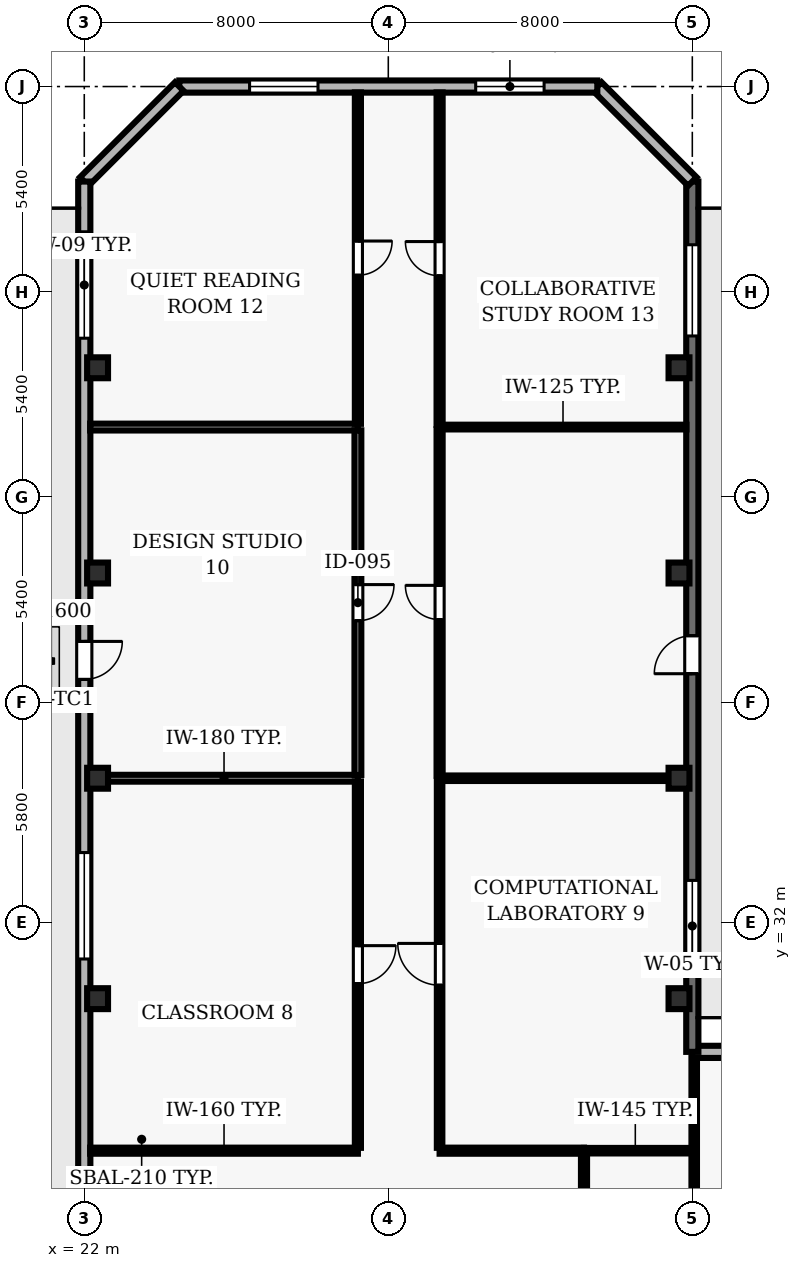
"""IFC4 building model, lengths in metres.
Left out: names, types, materials, properties, quantities, classifications, styles, units other than length and angle.
Written with IfcOpenShell. Run it as: python <this file> out.ifc"""

import sys

from ifc_helpers import new_model, si_unit, direction, frame, frame_2d, origin, origin_2d, place, context, subcontext, project, spatial, rectangle, hollow_rectangle, extrude, element, fill, save


model = new_model("IFC4")
c1 = context("Model", 3, precision=1e-05, world=origin(), true_north=direction((0.0, 1.0)))
c2 = subcontext(c1, "Body", "Model", "MODEL_VIEW")
j1 = project(units=[si_unit("LENGTHUNIT", "METRE"), si_unit("PLANEANGLEUNIT", "RADIAN")], contexts=[c1])
p1 = place(None, origin())
s1 = spatial("IfcSite", under=j1, at=p1, CompositionType="ELEMENT")
p2 = place(p1, origin())
s2 = spatial("IfcBuilding", under=s1, at=p2, CompositionType="ELEMENT")
p3 = place(p2, frame((0.0, 0.0, 38.8)))
s3 = spatial("IfcBuildingStorey", under=s2, at=p3, CompositionType="ELEMENT", Elevation=38.8)
for number, where, z_axis, x_axis in (
    (1, (22.35, 30.0, 0.0), (0.0, 0.0, 1.0), (1.0, 0.0, 0.0)),
    (2, (37.65, 30.0, 0.0), (0.0, 0.0, 1.0), (1.0, 0.0, 0.0)),
    (3, (22.35, 35.8, 0.0), (0.0, 0.0, 1.0), (1.0, 0.0, 0.0)),
    (4, (37.65, 35.8, 0.0), (0.0, 0.0, 1.0), (1.0, 0.0, 0.0)),
    (5, (22.35, 41.2, 0.0), (0.0, 0.0, 1.0), (1.0, 0.0, 0.0)),
    (6, (37.65, 41.2, 0.0), (0.0, 0.0, 1.0), (1.0, 0.0, 0.0)),
    (7, (22.35, 46.6, 0.0), (0.0, 0.0, 1.0), (1.0, 0.0, 0.0)),
    (8, (37.65, 46.6, 0.0), (0.0, 0.0, 1.0), (1.0, 0.0, 0.0)),
):
    element("IfcColumn", number, at=place(p3, frame(where, z_axis=z_axis, x_axis=x_axis)), inside=s3, PredefinedType="COLUMN", context=c2, shape_type="SweptSolid", body=[
        extrude(hollow_rectangle(XDim=0.55, YDim=0.55, WallThickness=0.025, at=origin_2d()), origin(), (0.0, 0.0, 1.0), 3.9),
    ])
p4 = place(p3, frame((54.3, 28.6, 0.0), z_axis=(0.0, 0.0, 1.0), x_axis=(-1.0, 0.0, 0.0)))
e9 = element("IfcWall", 9, at=p4, inside=s3, PredefinedType="SOLIDWALL", context=c2, shape_type="SweptSolid", body=[
    extrude(rectangle(XDim=16.3, YDim=0.32, at=frame_2d((8.15, 0.0))), origin(), (0.0, 0.0, 1.0), 3.69),
])
p5 = place(p4, frame((1.667, 0.0, 0.9)))
e10 = element("IfcOpeningElement", 10, at=p5, cuts=e9, PredefinedType="OPENING", context=c2, shape_type="SweptSolid", body=[
    extrude(rectangle(XDim=2.1, YDim=1.6, at=frame_2d((1.05, 0.8))), frame((0.0, 0.17, 0.0), z_axis=(0.0, -1.0, 0.0), x_axis=(1.0, 0.0, 0.0)), (0.0, 0.0, 1.0), 0.34),
])
p6 = place(p4, frame((7.1, 0.0, 0.9)))
e11 = element("IfcOpeningElement", 11, at=p6, cuts=e9, PredefinedType="OPENING", context=c2, shape_type="SweptSolid", body=[
    extrude(rectangle(XDim=2.1, YDim=1.6, at=frame_2d((1.05, 0.8))), frame((0.0, 0.17, 0.0), z_axis=(0.0, -1.0, 0.0), x_axis=(1.0, 0.0, 0.0)), (0.0, 0.0, 1.0), 0.34),
])
p7 = place(p4, frame((12.533, 0.0, 0.9)))
e12 = element("IfcOpeningElement", 12, at=p7, cuts=e9, PredefinedType="OPENING", context=c2, shape_type="SweptSolid", body=[
    extrude(rectangle(XDim=2.1, YDim=1.6, at=frame_2d((1.05, 0.8))), frame((0.0, 0.17, 0.0), z_axis=(0.0, -1.0, 0.0), x_axis=(1.0, 0.0, 0.0)), (0.0, 0.0, 1.0), 0.34),
])
p8 = place(p3, frame((38.0, 28.6, 0.0), z_axis=(0.0, 0.0, 1.0), x_axis=(0.0, 1.0, 0.0)))
e13 = element("IfcWall", 13, at=p8, inside=s3, PredefinedType="SOLIDWALL", context=c2, shape_type="SweptSolid", body=[
    extrude(rectangle(XDim=22.9, YDim=0.32, at=frame_2d((11.45, 0.0))), origin(), (0.0, 0.0, 1.0), 3.69),
])
p9 = place(p8, frame((9.95, 0.0, 0.0)))
e14 = element("IfcOpeningElement", 14, at=p9, cuts=e13, PredefinedType="OPENING", context=c2, shape_type="SweptSolid", body=[
    extrude(rectangle(XDim=1.0, YDim=2.2, at=frame_2d((0.5, 1.1))), frame((0.0, 0.17, 0.0), z_axis=(0.0, -1.0, 0.0), x_axis=(1.0, 0.0, 0.0)), (0.0, 0.0, 1.0), 0.34),
])
p10 = place(p8, frame((2.112, 0.0, 0.9)))
e15 = element("IfcOpeningElement", 15, at=p10, cuts=e13, PredefinedType="OPENING", context=c2, shape_type="SweptSolid", body=[
    extrude(rectangle(XDim=2.4, YDim=1.6, at=frame_2d((1.2, 0.8))), frame((0.0, 0.17, 0.0), z_axis=(0.0, -1.0, 0.0), x_axis=(1.0, 0.0, 0.0)), (0.0, 0.0, 1.0), 0.34),
])
p11 = place(p8, frame((18.837, 0.0, 0.9)))
e16 = element("IfcOpeningElement", 16, at=p11, cuts=e13, PredefinedType="OPENING", context=c2, shape_type="SweptSolid", body=[
    extrude(rectangle(XDim=2.4, YDim=1.6, at=frame_2d((1.2, 0.8))), frame((0.0, 0.17, 0.0), z_axis=(0.0, -1.0, 0.0), x_axis=(1.0, 0.0, 0.0)), (0.0, 0.0, 1.0), 0.34),
])
p12 = place(p3, frame((38.0, 51.5, 0.0), z_axis=(0.0, 0.0, 1.0), x_axis=(-0.707106781187, 0.707106781187, 0.0)))
e17 = element("IfcWall", 17, at=p12, inside=s3, PredefinedType="SOLIDWALL", context=c2, shape_type="SweptSolid", body=[
    extrude(rectangle(XDim=3.536, YDim=0.32, at=frame_2d((1.768, 0.0))), origin(), (0.0, 0.0, 1.0), 3.69),
])
p13 = place(p3, frame((35.5, 54.0, 0.0), z_axis=(0.0, 0.0, 1.0), x_axis=(-1.0, 0.0, 0.0)))
e18 = element("IfcWall", 18, at=p13, inside=s3, PredefinedType="SOLIDWALL", context=c2, shape_type="SweptSolid", body=[
    extrude(rectangle(XDim=11.0, YDim=0.32, at=frame_2d((5.5, 0.0))), origin(), (0.0, 0.0, 1.0), 3.69),
])
p14 = place(p13, frame((1.4, 0.0, 0.9)))
e19 = element("IfcOpeningElement", 19, at=p14, cuts=e18, PredefinedType="OPENING", context=c2, shape_type="SweptSolid", body=[
    extrude(rectangle(XDim=1.8, YDim=1.8, at=frame_2d((0.9, 0.9))), frame((0.0, 0.17, 0.0), z_axis=(0.0, -1.0, 0.0), x_axis=(1.0, 0.0, 0.0)), (0.0, 0.0, 1.0), 0.34),
])
p15 = place(p13, frame((7.35, 0.0, 0.9)))
e20 = element("IfcOpeningElement", 20, at=p15, cuts=e18, PredefinedType="OPENING", context=c2, shape_type="SweptSolid", body=[
    extrude(rectangle(XDim=1.8, YDim=1.8, at=frame_2d((0.9, 0.9))), frame((0.0, 0.17, 0.0), z_axis=(0.0, -1.0, 0.0), x_axis=(1.0, 0.0, 0.0)), (0.0, 0.0, 1.0), 0.34),
])
p16 = place(p3, frame((24.5, 54.0, 0.0), z_axis=(0.0, 0.0, 1.0), x_axis=(-0.707106781187, -0.707106781187, 0.0)))
e21 = element("IfcWall", 21, at=p16, inside=s3, PredefinedType="SOLIDWALL", context=c2, shape_type="SweptSolid", body=[
    extrude(rectangle(XDim=3.536, YDim=0.32, at=frame_2d((1.768, 0.0))), origin(), (0.0, 0.0, 1.0), 3.69),
])
p17 = place(p3, frame((22.0, 51.5, 0.0), z_axis=(0.0, 0.0, 1.0), x_axis=(0.0, -1.0, 0.0)))
e22 = element("IfcWall", 22, at=p17, inside=s3, PredefinedType="SOLIDWALL", context=c2, shape_type="SweptSolid", body=[
    extrude(rectangle(XDim=49.0, YDim=0.32, at=frame_2d((24.5, 0.0))), origin(), (0.0, 0.0, 1.0), 3.69),
])
p18 = place(p17, frame((12.1, 0.0, 0.0)))
e23 = element("IfcOpeningElement", 23, at=p18, cuts=e22, PredefinedType="OPENING", context=c2, shape_type="SweptSolid", body=[
    extrude(rectangle(XDim=1.0, YDim=2.2, at=frame_2d((0.5, 1.1))), frame((0.0, 0.17, 0.0), z_axis=(0.0, -1.0, 0.0), x_axis=(1.0, 0.0, 0.0)), (0.0, 0.0, 1.0), 0.34),
])
p19 = place(p17, frame((1.322, 0.0, 0.9)))
e24 = element("IfcOpeningElement", 24, at=p19, cuts=e22, PredefinedType="OPENING", context=c2, shape_type="SweptSolid", body=[
    extrude(rectangle(XDim=2.8, YDim=1.8, at=frame_2d((1.4, 0.9))), frame((0.0, 0.17, 0.0), z_axis=(0.0, -1.0, 0.0), x_axis=(1.0, 0.0, 0.0)), (0.0, 0.0, 1.0), 0.34),
])
p20 = place(p17, frame((17.656, 0.0, 0.9)))
e25 = element("IfcOpeningElement", 25, at=p20, cuts=e22, PredefinedType="OPENING", context=c2, shape_type="SweptSolid", body=[
    extrude(rectangle(XDim=2.8, YDim=1.8, at=frame_2d((1.4, 0.9))), frame((0.0, 0.17, 0.0), z_axis=(0.0, -1.0, 0.0), x_axis=(1.0, 0.0, 0.0)), (0.0, 0.0, 1.0), 0.34),
])
p21 = place(p17, frame((28.994, 0.0, 0.9)))
e26 = element("IfcOpeningElement", 26, at=p21, cuts=e22, PredefinedType="OPENING", context=c2, shape_type="SweptSolid", body=[
    extrude(rectangle(XDim=2.8, YDim=1.8, at=frame_2d((1.4, 0.9))), frame((0.0, 0.17, 0.0), z_axis=(0.0, -1.0, 0.0), x_axis=(1.0, 0.0, 0.0)), (0.0, 0.0, 1.0), 0.34),
])
p22 = place(p17, frame((33.089, 0.0, 0.9)))
e27 = element("IfcOpeningElement", 27, at=p22, cuts=e22, PredefinedType="OPENING", context=c2, shape_type="SweptSolid", body=[
    extrude(rectangle(XDim=2.8, YDim=1.8, at=frame_2d((1.4, 0.9))), frame((0.0, 0.17, 0.0), z_axis=(0.0, -1.0, 0.0), x_axis=(1.0, 0.0, 0.0)), (0.0, 0.0, 1.0), 0.34),
])
p23 = place(p17, frame((39.433, 0.0, 0.9)))
e28 = element("IfcOpeningElement", 28, at=p23, cuts=e22, PredefinedType="OPENING", context=c2, shape_type="SweptSolid", body=[
    extrude(rectangle(XDim=2.8, YDim=1.8, at=frame_2d((1.4, 0.9))), frame((0.0, 0.17, 0.0), z_axis=(0.0, -1.0, 0.0), x_axis=(1.0, 0.0, 0.0)), (0.0, 0.0, 1.0), 0.34),
])
p24 = place(p3, frame((29.2, 26.0, 0.0), z_axis=(0.0, 0.0, 1.0), x_axis=(-1.0, 0.0, 0.0)))
e29 = element("IfcWall", 29, at=p24, inside=s3, PredefinedType="PARTITIONING", context=c2, shape_type="SweptSolid", body=[
    extrude(rectangle(XDim=7.045, YDim=0.16, at=frame_2d((3.522, 0.0))), origin(), (0.0, 0.0, 1.0), 3.69),
])
p25 = place(p3, frame((29.2, 35.8, 0.0), z_axis=(0.0, 0.0, 1.0), x_axis=(-1.0, 0.0, 0.0)))
e30 = element("IfcWall", 30, at=p25, inside=s3, PredefinedType="PARTITIONING", context=c2, shape_type="SweptSolid", body=[
    extrude(rectangle(XDim=7.045, YDim=0.18, at=frame_2d((3.522, 0.0))), origin(), (0.0, 0.0, 1.0), 2.995),
])
p26 = place(p3, frame((29.2, 45.04, 0.0), z_axis=(0.0, 0.0, 1.0), x_axis=(-1.0, 0.0, 0.0)))
e31 = element("IfcWall", 31, at=p26, inside=s3, PredefinedType="PARTITIONING", context=c2, shape_type="SweptSolid", body=[
    extrude(rectangle(XDim=7.045, YDim=0.18, at=frame_2d((3.522, 0.0))), origin(), (0.0, 0.0, 1.0), 3.69),
])
p27 = place(p3, frame((35.15, 26.0, 0.0), z_axis=(0.0, 0.0, 1.0), x_axis=(-1.0, 0.0, 0.0)))
e32 = element("IfcWall", 32, at=p27, inside=s3, PredefinedType="PARTITIONING", context=c2, shape_type="SweptSolid", body=[
    extrude(rectangle(XDim=3.8, YDim=0.16, at=frame_2d((1.9, 0.0))), origin(), (0.0, 0.0, 1.0), 3.69),
])
p28 = place(p3, frame((35.15, 26.0, 0.0), z_axis=(0.0, 0.0, 1.0), x_axis=(1.0, 0.0, 0.0)))
e33 = element("IfcWall", 33, at=p28, inside=s3, PredefinedType="PARTITIONING", context=c2, shape_type="SweptSolid", body=[
    extrude(rectangle(XDim=2.7, YDim=0.145, at=frame_2d((1.35, 0.0))), origin(), (0.0, 0.0, 1.0), 3.69),
])
p29 = place(p3, frame((37.845, 35.8, 0.0), z_axis=(0.0, 0.0, 1.0), x_axis=(-1.0, 0.0, 0.0)))
e34 = element("IfcWall", 34, at=p29, inside=s3, PredefinedType="PARTITIONING", context=c2, shape_type="SweptSolid", body=[
    extrude(rectangle(XDim=6.495, YDim=0.145, at=frame_2d((3.248, 0.0))), origin(), (0.0, 0.0, 1.0), 2.995),
])
p30 = place(p3, frame((37.845, 45.04, 0.0), z_axis=(0.0, 0.0, 1.0), x_axis=(-1.0, 0.0, 0.0)))
e35 = element("IfcWall", 35, at=p30, inside=s3, PredefinedType="PARTITIONING", context=c2, shape_type="SweptSolid", body=[
    extrude(rectangle(XDim=6.495, YDim=0.125, at=frame_2d((3.248, 0.0))), origin(), (0.0, 0.0, 1.0), 3.69),
])
p31 = place(p3, frame((29.2, 35.715, 0.0), z_axis=(0.0, 0.0, 1.0), x_axis=(0.0, -1.0, 0.0)))
e36 = element("IfcWall", 36, at=p31, inside=s3, PredefinedType="PARTITIONING", context=c2, shape_type="SweptSolid", body=[
    extrude(rectangle(XDim=9.64, YDim=0.16, at=frame_2d((4.82, 0.0))), origin(), (0.0, 0.0, 1.0), 3.69),
])
p32 = place(p31, frame((4.32, 0.0, 0.0)))
e37 = element("IfcOpeningElement", 37, at=p32, cuts=e36, PredefinedType="OPENING", context=c2, shape_type="SweptSolid", body=[
    extrude(rectangle(XDim=1.0, YDim=2.1, at=frame_2d((0.5, 1.05))), frame((0.0, 0.09, 0.0), z_axis=(0.0, -1.0, 0.0), x_axis=(1.0, 0.0, 0.0)), (0.0, 0.0, 1.0), 0.18),
])
p33 = place(p3, frame((29.2, 44.955, 0.0), z_axis=(0.0, 0.0, 1.0), x_axis=(0.0, -1.0, 0.0)))
e38 = element("IfcWall", 38, at=p33, inside=s3, PredefinedType="PARTITIONING", context=c2, shape_type="SweptSolid", body=[
    extrude(rectangle(XDim=9.07, YDim=0.18, at=frame_2d((4.535, 0.0))), origin(), (0.0, 0.0, 1.0), 3.69),
])
p34 = place(p33, frame((4.06, 0.0, 0.0)))
e39 = element("IfcOpeningElement", 39, at=p34, cuts=e38, PredefinedType="OPENING", context=c2, shape_type="SweptSolid", body=[
    extrude(rectangle(XDim=0.95, YDim=2.1, at=frame_2d((0.475, 1.05))), frame((0.0, 0.1, 0.0), z_axis=(0.0, -1.0, 0.0), x_axis=(1.0, 0.0, 0.0)), (0.0, 0.0, 1.0), 0.2),
])
p35 = place(p3, frame((29.2, 53.845, 0.0), z_axis=(0.0, 0.0, 1.0), x_axis=(0.0, -1.0, 0.0)))
e40 = element("IfcWall", 40, at=p35, inside=s3, PredefinedType="PARTITIONING", context=c2, shape_type="SweptSolid", body=[
    extrude(rectangle(XDim=8.72, YDim=0.16, at=frame_2d((4.36, 0.0))), origin(), (0.0, 0.0, 1.0), 3.69),
])
p36 = place(p35, frame((3.91, 0.0, 0.0)))
e41 = element("IfcOpeningElement", 41, at=p36, cuts=e40, PredefinedType="OPENING", context=c2, shape_type="SweptSolid", body=[
    extrude(rectangle(XDim=0.9, YDim=2.1, at=frame_2d((0.45, 1.05))), frame((0.0, 0.09, 0.0), z_axis=(0.0, -1.0, 0.0), x_axis=(1.0, 0.0, 0.0)), (0.0, 0.0, 1.0), 0.18),
])
p37 = place(p3, frame((31.35, 26.075, 0.0), z_axis=(0.0, 0.0, 1.0), x_axis=(0.0, 1.0, 0.0)))
e42 = element("IfcWall", 42, at=p37, inside=s3, PredefinedType="PARTITIONING", context=c2, shape_type="SweptSolid", body=[
    extrude(rectangle(XDim=9.657, YDim=0.145, at=frame_2d((4.829, 0.0))), origin(), (0.0, 0.0, 1.0), 3.69),
])
p38 = place(p37, frame((4.279, 0.0, 0.0)))
e43 = element("IfcOpeningElement", 43, at=p38, cuts=e42, PredefinedType="OPENING", context=c2, shape_type="SweptSolid", body=[
    extrude(rectangle(XDim=1.1, YDim=2.15, at=frame_2d((0.55, 1.075))), frame((0.0, 0.083, 0.0), z_axis=(0.0, -1.0, 0.0), x_axis=(1.0, 0.0, 0.0)), (0.0, 0.0, 1.0), 0.165),
])
p39 = place(p3, frame((31.35, 35.867, 0.0), z_axis=(0.0, 0.0, 1.0), x_axis=(0.0, 1.0, 0.0)))
e44 = element("IfcWall", 44, at=p39, inside=s3, PredefinedType="PARTITIONING", context=c2, shape_type="SweptSolid", body=[
    extrude(rectangle(XDim=9.116, YDim=0.16, at=frame_2d((4.558, 0.0))), origin(), (0.0, 0.0, 1.0), 3.69),
])
p40 = place(p39, frame((4.108, 0.0, 0.0)))
e45 = element("IfcOpeningElement", 45, at=p40, cuts=e44, PredefinedType="OPENING", context=c2, shape_type="SweptSolid", body=[
    extrude(rectangle(XDim=0.9, YDim=2.1, at=frame_2d((0.45, 1.05))), frame((0.0, 0.09, 0.0), z_axis=(0.0, -1.0, 0.0), x_axis=(1.0, 0.0, 0.0)), (0.0, 0.0, 1.0), 0.18),
])
p41 = place(p3, frame((31.35, 45.097, 0.0), z_axis=(0.0, 0.0, 1.0), x_axis=(0.0, 1.0, 0.0)))
e46 = element("IfcWall", 46, at=p41, inside=s3, PredefinedType="PARTITIONING", context=c2, shape_type="SweptSolid", body=[
    extrude(rectangle(XDim=8.748, YDim=0.16, at=frame_2d((4.374, 0.0))), origin(), (0.0, 0.0, 1.0), 3.69),
])
p42 = place(p41, frame((3.924, 0.0, 0.0)))
e47 = element("IfcOpeningElement", 47, at=p42, cuts=e46, PredefinedType="OPENING", context=c2, shape_type="SweptSolid", body=[
    extrude(rectangle(XDim=0.9, YDim=2.1, at=frame_2d((0.45, 1.05))), frame((0.0, 0.09, 0.0), z_axis=(0.0, -1.0, 0.0), x_axis=(1.0, 0.0, 0.0)), (0.0, 0.0, 1.0), 0.18),
])
p43 = place(p3, frame((35.15, 24.07, 0.0), z_axis=(0.0, 0.0, 1.0), x_axis=(0.0, 1.0, 0.0)))
e48 = element("IfcWall", 48, at=p43, inside=s3, PredefinedType="PARTITIONING", context=c2, shape_type="SweptSolid", body=[
    extrude(rectangle(XDim=1.855, YDim=0.16, at=frame_2d((0.927, 0.0))), origin(), (0.0, 0.0, 1.0), 3.69),
])
p44 = place(p3, frame((38.05, 28.445, 0.0), z_axis=(0.0, 0.0, 1.0), x_axis=(0.0, -1.0, 0.0)))
e49 = element("IfcWall", 49, at=p44, inside=s3, PredefinedType="PARTITIONING", context=c2, shape_type="SweptSolid", body=[
    extrude(rectangle(XDim=4.395, YDim=0.145, at=frame_2d((2.198, 0.0))), origin(), (0.0, 0.0, 1.0), 2.995),
])
p45 = place(p9, origin())
e50 = element("IfcDoor", 50, at=p45, inside=s3, OperationType="SINGLE_SWING_LEFT", PredefinedType="DOOR", context=c2, shape_type="SweptSolid", body=[
    extrude(rectangle(XDim=1.0, YDim=2.2, at=frame_2d((0.5, 1.1))), frame((0.0, 0.025, 0.0), z_axis=(0.0, -1.0, 0.0), x_axis=(1.0, 0.0, 0.0)), (0.0, 0.0, 1.0), 0.05),
])
fill(e14, e50)
p46 = place(p10, origin())
e51 = element("IfcWindow", 51, at=p46, inside=s3, PartitioningType="SINGLE_PANEL", PredefinedType="WINDOW", context=c2, shape_type="SweptSolid", body=[
    extrude(rectangle(XDim=2.4, YDim=1.6, at=frame_2d((1.2, 0.8))), frame((0.0, 0.03, 0.0), z_axis=(0.0, -1.0, 0.0), x_axis=(1.0, 0.0, 0.0)), (0.0, 0.0, 1.0), 0.06),
])
fill(e15, e51)
p47 = place(p11, origin())
e52 = element("IfcWindow", 52, at=p47, inside=s3, PartitioningType="SINGLE_PANEL", PredefinedType="WINDOW", context=c2, shape_type="SweptSolid", body=[
    extrude(rectangle(XDim=2.4, YDim=1.6, at=frame_2d((1.2, 0.8))), frame((0.0, 0.03, 0.0), z_axis=(0.0, -1.0, 0.0), x_axis=(1.0, 0.0, 0.0)), (0.0, 0.0, 1.0), 0.06),
])
fill(e16, e52)
p48 = place(p14, origin())
e53 = element("IfcWindow", 53, at=p48, inside=s3, PartitioningType="SINGLE_PANEL", PredefinedType="WINDOW", context=c2, shape_type="SweptSolid", body=[
    extrude(rectangle(XDim=1.8, YDim=1.8, at=frame_2d((0.9, 0.9))), frame((0.0, 0.03, 0.0), z_axis=(0.0, -1.0, 0.0), x_axis=(1.0, 0.0, 0.0)), (0.0, 0.0, 1.0), 0.06),
])
fill(e19, e53)
p49 = place(p15, origin())
e54 = element("IfcWindow", 54, at=p49, inside=s3, PartitioningType="SINGLE_PANEL", PredefinedType="WINDOW", context=c2, shape_type="SweptSolid", body=[
    extrude(rectangle(XDim=1.8, YDim=1.8, at=frame_2d((0.9, 0.9))), frame((0.0, 0.03, 0.0), z_axis=(0.0, -1.0, 0.0), x_axis=(1.0, 0.0, 0.0)), (0.0, 0.0, 1.0), 0.06),
])
fill(e20, e54)
p50 = place(p18, origin())
e55 = element("IfcDoor", 55, at=p50, inside=s3, OperationType="SINGLE_SWING_LEFT", PredefinedType="DOOR", context=c2, shape_type="SweptSolid", body=[
    extrude(rectangle(XDim=1.0, YDim=2.2, at=frame_2d((0.5, 1.1))), frame((0.0, 0.025, 0.0), z_axis=(0.0, -1.0, 0.0), x_axis=(1.0, 0.0, 0.0)), (0.0, 0.0, 1.0), 0.05),
])
fill(e23, e55)
p51 = place(p19, origin())
e56 = element("IfcWindow", 56, at=p51, inside=s3, PartitioningType="SINGLE_PANEL", PredefinedType="WINDOW", context=c2, shape_type="SweptSolid", body=[
    extrude(rectangle(XDim=2.8, YDim=1.8, at=frame_2d((1.4, 0.9))), frame((0.0, 0.03, 0.0), z_axis=(0.0, -1.0, 0.0), x_axis=(1.0, 0.0, 0.0)), (0.0, 0.0, 1.0), 0.06),
])
fill(e24, e56)
p52 = place(p20, origin())
e57 = element("IfcWindow", 57, at=p52, inside=s3, PartitioningType="SINGLE_PANEL", PredefinedType="WINDOW", context=c2, shape_type="SweptSolid", body=[
    extrude(rectangle(XDim=2.8, YDim=1.8, at=frame_2d((1.4, 0.9))), frame((0.0, 0.03, 0.0), z_axis=(0.0, -1.0, 0.0), x_axis=(1.0, 0.0, 0.0)), (0.0, 0.0, 1.0), 0.06),
])
fill(e25, e57)
p53 = place(p32, origin())
e58 = element("IfcDoor", 58, at=p53, inside=s3, OperationType="SINGLE_SWING_LEFT", PredefinedType="DOOR", context=c2, shape_type="SweptSolid", body=[
    extrude(rectangle(XDim=1.0, YDim=2.1, at=frame_2d((0.5, 1.05))), frame((0.0, 0.025, 0.0), z_axis=(0.0, -1.0, 0.0), x_axis=(1.0, 0.0, 0.0)), (0.0, 0.0, 1.0), 0.05),
])
fill(e37, e58)
p54 = place(p38, origin())
e59 = element("IfcDoor", 59, at=p54, inside=s3, OperationType="SINGLE_SWING_RIGHT", PredefinedType="DOOR", context=c2, shape_type="SweptSolid", body=[
    extrude(rectangle(XDim=1.1, YDim=2.15, at=frame_2d((0.55, 1.075))), frame((0.0, 0.025, 0.0), z_axis=(0.0, -1.0, 0.0), x_axis=(1.0, 0.0, 0.0)), (0.0, 0.0, 1.0), 0.05),
])
fill(e43, e59)
p55 = place(p34, origin())
e60 = element("IfcDoor", 60, at=p55, inside=s3, OperationType="SINGLE_SWING_LEFT", PredefinedType="DOOR", context=c2, shape_type="SweptSolid", body=[
    extrude(rectangle(XDim=0.95, YDim=2.1, at=frame_2d((0.475, 1.05))), frame((0.0, 0.025, 0.0), z_axis=(0.0, -1.0, 0.0), x_axis=(1.0, 0.0, 0.0)), (0.0, 0.0, 1.0), 0.05),
])
fill(e39, e60)
p56 = place(p40, origin())
e61 = element("IfcDoor", 61, at=p56, inside=s3, OperationType="SINGLE_SWING_RIGHT", PredefinedType="DOOR", context=c2, shape_type="SweptSolid", body=[
    extrude(rectangle(XDim=0.9, YDim=2.1, at=frame_2d((0.45, 1.05))), frame((0.0, 0.025, 0.0), z_axis=(0.0, -1.0, 0.0), x_axis=(1.0, 0.0, 0.0)), (0.0, 0.0, 1.0), 0.05),
])
fill(e45, e61)
p57 = place(p36, origin())
e62 = element("IfcDoor", 62, at=p57, inside=s3, OperationType="SINGLE_SWING_LEFT", PredefinedType="DOOR", context=c2, shape_type="SweptSolid", body=[
    extrude(rectangle(XDim=0.9, YDim=2.1, at=frame_2d((0.45, 1.05))), frame((0.0, 0.025, 0.0), z_axis=(0.0, -1.0, 0.0), x_axis=(1.0, 0.0, 0.0)), (0.0, 0.0, 1.0), 0.05),
])
fill(e41, e62)
p58 = place(p42, origin())
e63 = element("IfcDoor", 63, at=p58, inside=s3, OperationType="SINGLE_SWING_RIGHT", PredefinedType="DOOR", context=c2, shape_type="SweptSolid", body=[
    extrude(rectangle(XDim=0.9, YDim=2.1, at=frame_2d((0.45, 1.05))), frame((0.0, 0.025, 0.0), z_axis=(0.0, -1.0, 0.0), x_axis=(1.0, 0.0, 0.0)), (0.0, 0.0, 1.0), 0.05),
])
fill(e47, e63)
save(model, sys.argv[1])
